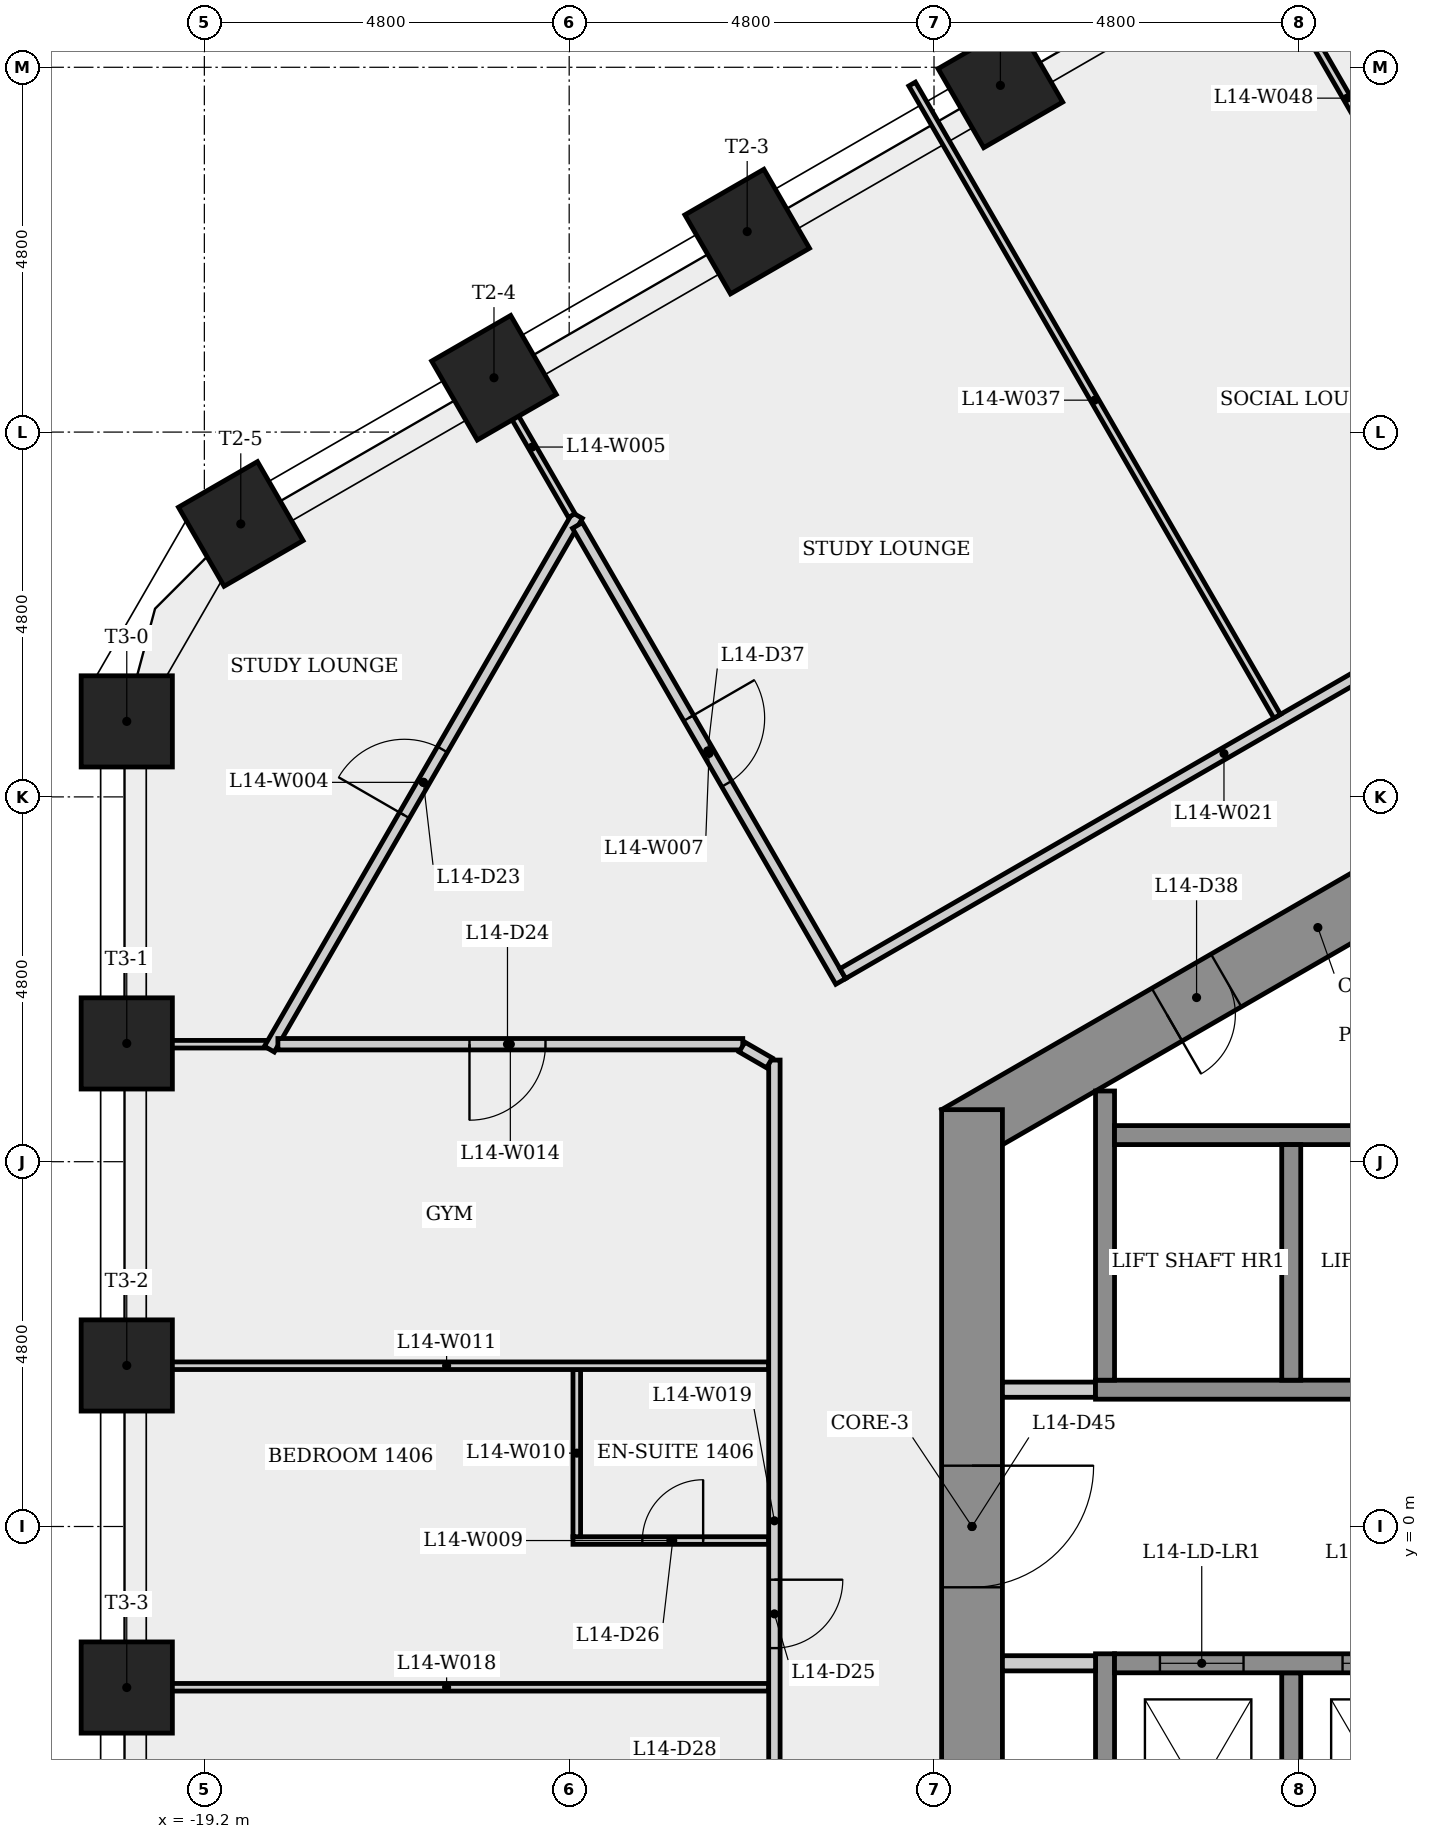
"""IFC4 building model, lengths in metres.
Left out: names, types, materials, properties, quantities, classifications, styles, units other than length and angle.
Written with IfcOpenShell. Run it as: python <this file> out.ifc"""

import sys

from ifc_helpers import new_model, si_unit, direction, frame, frame_2d, origin, origin_2d, place, context, subcontext, project, spatial, rectangle, extrude, element, fill, save


model = new_model("IFC4")
c1 = context("Model", 3, precision=1e-05, world=origin(), true_north=direction((0.0, 1.0)))
c2 = subcontext(c1, "Body", "Model", "MODEL_VIEW")
j1 = project(units=[si_unit("LENGTHUNIT", "METRE"), si_unit("PLANEANGLEUNIT", "RADIAN")], contexts=[c1])
p1 = place(None, origin())
s1 = spatial("IfcSite", under=j1, at=p1, CompositionType="ELEMENT")
p2 = place(p1, origin())
s2 = spatial("IfcBuilding", under=s1, at=p2, CompositionType="ELEMENT")
p3 = place(p2, frame((0.0, 0.0, 56.1)))
s3 = spatial("IfcBuildingStorey", under=s2, at=p3, CompositionType="ELEMENT", Elevation=56.1)
p4 = place(p3, frame((0.2, 10.623, 0.0), z_axis=(0.0, 0.0, 1.0), x_axis=(-0.866023993627, -0.500002442456, 0.0)))
e1 = element("IfcWall", 1, at=p4, inside=s3, PredefinedType="SHEAR", context=c2, shape_type="SweptSolid", body=[
    extrude(rectangle(XDim=10.97, YDim=0.8, at=frame_2d((5.485, 0.0))), origin(), (0.0, 0.0, 1.0), 3.4),
])
p5 = place(p4, frame((6.877, 0.0, 0.0)))
e2 = element("IfcOpeningElement", 2, at=p5, cuts=e1, PredefinedType="OPENING", context=c2, shape_type="SweptSolid", body=[
    extrude(rectangle(XDim=0.9, YDim=2.1, at=frame_2d((0.45, 1.05))), frame((0.0, 0.41, 0.0), z_axis=(0.0, -1.0, 0.0), x_axis=(1.0, 0.0, 0.0)), (0.0, 0.0, 1.0), 0.82),
])
p6 = place(p3, frame((-9.1, 5.485, 0.0), z_axis=(0.0, 0.0, 1.0), x_axis=(0.0, -1.0, 0.0)))
e3 = element("IfcWall", 3, at=p6, inside=s3, PredefinedType="SHEAR", context=c2, shape_type="SweptSolid", body=[
    extrude(rectangle(XDim=10.97, YDim=0.8, at=frame_2d((5.485, 0.0))), origin(), (0.0, 0.0, 1.0), 3.4),
])
p7 = place(p6, frame((4.685, 0.0, 0.0)))
e4 = element("IfcOpeningElement", 4, at=p7, cuts=e3, PredefinedType="OPENING", context=c2, shape_type="SweptSolid", body=[
    extrude(rectangle(XDim=1.6, YDim=2.1, at=frame_2d((0.8, 1.05))), frame((0.0, 0.41, 0.0), z_axis=(0.0, -1.0, 0.0), x_axis=(1.0, 0.0, 0.0)), (0.0, 0.0, 1.0), 0.82),
])
for number, where, z_axis, x_axis in (
    (5, (-8.727, 18.962, 0.0), (0.0, 0.0, 1.0), (-0.5, 0.866, 0.0)),
    (6, (-12.058, 17.038, 0.0), (0.0, 0.0, 1.0), (-0.5, 0.866, 0.0)),
    (7, (-15.389, 15.115, 0.0), (0.0, 0.0, 1.0), (-0.5, 0.866, 0.0)),
    (8, (-18.721, 13.192, 0.0), (0.0, 0.0, 1.0), (-0.5, 0.866, 0.0)),
    (9, (-20.221, 10.594, 0.0), (0.0, 0.0, 1.0), (-1.0, 0.0, 0.0)),
    (10, (-20.221, 6.356, 0.0), (0.0, 0.0, 1.0), (-1.0, 0.0, 0.0)),
    (11, (-20.221, 2.119, 0.0), (0.0, 0.0, 1.0), (-1.0, 0.0, 0.0)),
    (12, (-20.221, -2.119, 0.0), (0.0, 0.0, 1.0), (-1.0, 0.0, 0.0)),
):
    element("IfcColumn", number, at=place(p3, frame(where, z_axis=z_axis, x_axis=x_axis)), inside=s3, PredefinedType="COLUMN", context=c2, shape_type="SweptSolid", body=[
        extrude(rectangle(XDim=1.2, YDim=1.2, at=origin_2d()), origin(), (0.0, 0.0, 1.0), 3.4),
    ])
p8 = place(p3, frame((-18.382, 6.346, 0.0), z_axis=(0.0, 0.0, 1.0), x_axis=(-1.0, 0.0, 0.0)))
e13 = element("IfcWall", 13, at=p8, inside=s3, PredefinedType="PARTITIONING", context=c2, shape_type="SweptSolid", body=[
    extrude(rectangle(XDim=1.868, YDim=0.1, at=frame_2d((0.934, 0.0))), origin(), (0.0, 0.0, 1.0), 3.05),
])
p9 = place(p3, frame((-18.345, 6.281, 0.0), z_axis=(0.0, 0.0, 1.0), x_axis=(0.499990083853, 0.866031128799, 0.0)))
e14 = element("IfcWall", 14, at=p9, inside=s3, PredefinedType="PARTITIONING", context=c2, shape_type="SweptSolid", body=[
    extrude(rectangle(XDim=8.107, YDim=0.15, at=frame_2d((4.054, 0.0))), origin(), (0.0, 0.0, 1.0), 3.05),
])
p10 = place(p9, frame((3.553, 0.0, 0.0)))
e15 = element("IfcOpeningElement", 15, at=p10, cuts=e14, PredefinedType="OPENING", context=c2, shape_type="SweptSolid", body=[
    extrude(rectangle(XDim=1.0, YDim=2.1, at=frame_2d((0.5, 1.05))), frame((0.0, 0.085, 0.0), z_axis=(0.0, -1.0, 0.0), x_axis=(1.0, 0.0, 0.0)), (0.0, 0.0, 1.0), 0.17),
])
p11 = place(p3, frame((-15.407, 15.104, 0.0), z_axis=(0.0, 0.0, 1.0), x_axis=(0.500074377092, -0.865982457891, 0.0)))
e16 = element("IfcWall", 16, at=p11, inside=s3, PredefinedType="PARTITIONING", context=c2, shape_type="SweptSolid", body=[
    extrude(rectangle(XDim=2.082, YDim=0.1, at=frame_2d((1.041, 0.0))), origin(), (0.0, 0.0, 1.0), 3.05),
])
p12 = place(p3, frame((-14.291, 13.172, 0.0), z_axis=(0.0, 0.0, 1.0), x_axis=(0.499989880739, -0.866031246064, 0.0)))
e17 = element("IfcWall", 17, at=p12, inside=s3, PredefinedType="PARTITIONING", context=c2, shape_type="SweptSolid", body=[
    extrude(rectangle(XDim=6.928, YDim=0.15, at=frame_2d((3.464, 0.0))), origin(), (0.0, 0.0, 1.0), 3.05),
])
p13 = place(p12, frame((2.927, 0.0, 0.0)))
e18 = element("IfcOpeningElement", 18, at=p13, cuts=e17, PredefinedType="OPENING", context=c2, shape_type="SweptSolid", body=[
    extrude(rectangle(XDim=1.0, YDim=2.1, at=frame_2d((0.5, 1.05))), frame((0.0, 0.085, 0.0), z_axis=(0.0, -1.0, 0.0), x_axis=(1.0, 0.0, 0.0)), (0.0, 0.0, 1.0), 0.17),
])
p14 = place(p3, frame((-14.35, -0.185, 0.0), z_axis=(0.0, 0.0, 1.0), x_axis=(1.0, 0.0, 0.0)))
e19 = element("IfcWall", 19, at=p14, inside=s3, PredefinedType="PARTITIONING", context=c2, shape_type="SweptSolid", body=[
    extrude(rectangle(XDim=2.575, YDim=0.1, at=frame_2d((1.288, 0.0))), origin(), (0.0, 0.0, 1.0), 3.05),
])
p15 = place(p14, frame((0.913, 0.0, 0.0)))
e20 = element("IfcOpeningElement", 20, at=p15, cuts=e19, PredefinedType="OPENING", context=c2, shape_type="SweptSolid", body=[
    extrude(rectangle(XDim=0.8, YDim=2.1, at=frame_2d((0.4, 1.05))), frame((0.0, 0.06, 0.0), z_axis=(0.0, -1.0, 0.0), x_axis=(1.0, 0.0, 0.0)), (0.0, 0.0, 1.0), 0.12),
])
p16 = place(p3, frame((-14.3, 2.065, 0.0), z_axis=(0.0, 0.0, 1.0), x_axis=(0.0, -1.0, 0.0)))
e21 = element("IfcWall", 21, at=p16, inside=s3, PredefinedType="PARTITIONING", context=c2, shape_type="SweptSolid", body=[
    extrude(rectangle(XDim=2.2, YDim=0.1, at=frame_2d((1.1, 0.0))), origin(), (0.0, 0.0, 1.0), 3.05),
])
p17 = place(p3, frame((-20.25, 2.115, 0.0), z_axis=(0.0, 0.0, 1.0), x_axis=(1.0, 0.0, 0.0)))
e22 = element("IfcWall", 22, at=p17, inside=s3, PredefinedType="PARTITIONING", context=c2, shape_type="SweptSolid", body=[
    extrude(rectangle(XDim=8.476, YDim=0.1, at=frame_2d((4.238, 0.0))), origin(), (0.0, 0.0, 1.0), 3.05),
])
p18 = place(p3, frame((-12.116, 6.346, 0.0), z_axis=(0.0, 0.0, 1.0), x_axis=(-1.0, 0.0, 0.0)))
e23 = element("IfcWall", 23, at=p18, inside=s3, PredefinedType="PARTITIONING", context=c2, shape_type="SweptSolid", body=[
    extrude(rectangle(XDim=6.116, YDim=0.15, at=frame_2d((3.058, 0.0))), origin(), (0.0, 0.0, 1.0), 3.05),
])
p19 = place(p18, frame((2.596, 0.0, 0.0)))
e24 = element("IfcOpeningElement", 24, at=p19, cuts=e23, PredefinedType="OPENING", context=c2, shape_type="SweptSolid", body=[
    extrude(rectangle(XDim=1.0, YDim=2.1, at=frame_2d((0.5, 1.05))), frame((0.0, 0.085, 0.0), z_axis=(0.0, -1.0, 0.0), x_axis=(1.0, 0.0, 0.0)), (0.0, 0.0, 1.0), 0.17),
])
p20 = place(p3, frame((-11.775, -2.115, 0.0), z_axis=(0.0, 0.0, 1.0), x_axis=(-1.0, 0.0, 0.0)))
e25 = element("IfcWall", 25, at=p20, inside=s3, PredefinedType="PARTITIONING", context=c2, shape_type="SweptSolid", body=[
    extrude(rectangle(XDim=8.476, YDim=0.1, at=frame_2d((4.238, 0.0))), origin(), (0.0, 0.0, 1.0), 3.05),
])
p21 = place(p3, frame((-11.7, 6.137, 0.0), z_axis=(0.0, 0.0, 1.0), x_axis=(0.0, -1.0, 0.0)))
e26 = element("IfcWall", 26, at=p21, inside=s3, PredefinedType="PARTITIONING", context=c2, shape_type="SweptSolid", body=[
    extrude(rectangle(XDim=12.125, YDim=0.15, at=frame_2d((6.062, 0.0))), origin(), (0.0, 0.0, 1.0), 3.05),
])
p22 = place(p21, frame((6.837, 0.0, 0.0)))
e27 = element("IfcOpeningElement", 27, at=p22, cuts=e26, PredefinedType="OPENING", context=c2, shape_type="SweptSolid", body=[
    extrude(rectangle(XDim=0.9, YDim=2.1, at=frame_2d((0.45, 1.05))), frame((0.0, 0.085, 0.0), z_axis=(0.0, -1.0, 0.0), x_axis=(1.0, 0.0, 0.0)), (0.0, 0.0, 1.0), 0.17),
])
p23 = place(p3, frame((-11.765, 6.1, 0.0), z_axis=(0.0, 0.0, 1.0), x_axis=(-0.865893231143, 0.500228859883, 0.0)))
e28 = element("IfcWall", 28, at=p23, inside=s3, PredefinedType="PARTITIONING", context=c2, shape_type="SweptSolid", body=[
    extrude(rectangle(XDim=0.417, YDim=0.15, at=frame_2d((0.208, 0.0))), origin(), (0.0, 0.0, 1.0), 3.05),
])
p24 = place(p3, frame((-10.8, 7.275, 0.0), z_axis=(0.0, 0.0, 1.0), x_axis=(0.866027969706, 0.499995555667, 0.0)))
e29 = element("IfcWall", 29, at=p24, inside=s3, PredefinedType="PARTITIONING", context=c2, shape_type="SweptSolid", body=[
    extrude(rectangle(XDim=11.582, YDim=0.15, at=frame_2d((5.791, 0.0))), origin(), (0.0, 0.0, 1.0), 3.05),
])
p25 = place(p24, frame((8.589, 0.0, 0.0)))
e30 = element("IfcOpeningElement", 30, at=p25, cuts=e29, PredefinedType="OPENING", context=c2, shape_type="SweptSolid", body=[
    extrude(rectangle(XDim=1.0, YDim=2.1, at=frame_2d((0.5, 1.05))), frame((0.0, 0.085, 0.0), z_axis=(0.0, -1.0, 0.0), x_axis=(1.0, 0.0, 0.0)), (0.0, 0.0, 1.0), 0.17),
])
p26 = place(p3, frame((-8.7, 1.8, 0.0), z_axis=(0.0, 0.0, 1.0), x_axis=(1.0, 0.0, 0.0)))
e31 = element("IfcWall", 31, at=p26, inside=s3, PredefinedType="PARTITIONING", context=c2, shape_type="SweptSolid", body=[
    extrude(rectangle(XDim=1.225, YDim=0.2, at=frame_2d((0.613, 0.0))), origin(), (0.0, 0.0, 1.0), 3.05),
])
p27 = place(p3, frame((-7.475, 1.8, 0.0), z_axis=(0.0, 0.0, 1.0), x_axis=(1.0, 0.0, 0.0)))
e32 = element("IfcWall", 32, at=p27, inside=s3, PredefinedType="SHEAR", context=c2, shape_type="SweptSolid", body=[
    extrude(rectangle(XDim=14.95, YDim=0.25, at=frame_2d((7.475, 0.0))), origin(), (0.0, 0.0, 1.0), 3.05),
])
p28 = place(p3, frame((-7.35, -5.73, 0.0), z_axis=(0.0, 0.0, 1.0), x_axis=(0.0, 1.0, 0.0)))
e33 = element("IfcWall", 33, at=p28, inside=s3, PredefinedType="SHEAR", context=c2, shape_type="SweptSolid", body=[
    extrude(rectangle(XDim=4.055, YDim=0.25, at=frame_2d((2.028, 0.0))), origin(), (0.0, 0.0, 1.0), 3.05),
])
p29 = place(p3, frame((-7.35, 1.925, 0.0), z_axis=(0.0, 0.0, 1.0), x_axis=(0.0, 1.0, 0.0)))
e34 = element("IfcWall", 34, at=p29, inside=s3, PredefinedType="SHEAR", context=c2, shape_type="SweptSolid", body=[
    extrude(rectangle(XDim=3.805, YDim=0.25, at=frame_2d((1.903, 0.0))), origin(), (0.0, 0.0, 1.0), 3.05),
])
p30 = place(p3, frame((-7.225, 5.15, 0.0), z_axis=(0.0, 0.0, 1.0), x_axis=(1.0, 0.0, 0.0)))
e35 = element("IfcWall", 35, at=p30, inside=s3, PredefinedType="SHEAR", context=c2, shape_type="SweptSolid", body=[
    extrude(rectangle(XDim=14.7, YDim=0.25, at=frame_2d((7.35, 0.0))), origin(), (0.0, 0.0, 1.0), 3.05),
])
p31 = place(p3, frame((-7.475, -1.8, 0.0), z_axis=(0.0, 0.0, 1.0), x_axis=(-1.0, 0.0, 0.0)))
e36 = element("IfcWall", 36, at=p31, inside=s3, PredefinedType="PARTITIONING", context=c2, shape_type="SweptSolid", body=[
    extrude(rectangle(XDim=1.225, YDim=0.2, at=frame_2d((0.613, 0.0))), origin(), (0.0, 0.0, 1.0), 3.05),
])
p32 = place(p3, frame((-5.085, 10.661, 0.0), z_axis=(0.0, 0.0, 1.0), x_axis=(-0.49998793222, 0.866032371008, 0.0)))
e37 = element("IfcWall", 37, at=p32, inside=s3, PredefinedType="PARTITIONING", context=c2, shape_type="SweptSolid", body=[
    extrude(rectangle(XDim=9.606, YDim=0.1, at=frame_2d((4.803, 0.0))), origin(), (0.0, 0.0, 1.0), 3.05),
])
for number, where, z_axis, x_axis in (
    (38, (-4.9, -1.925, 0.0), (0.0, 0.0, 1.0), (0.0, -1.0, 0.0)),
    (39, (-4.9, 5.025, 0.0), (0.0, 0.0, 1.0), (0.0, -1.0, 0.0)),
):
    element("IfcWall", number, at=place(p3, frame(where, z_axis=z_axis, x_axis=x_axis)), inside=s3, PredefinedType="SHEAR", context=c2, shape_type="SweptSolid", body=[
        extrude(rectangle(XDim=3.1, YDim=0.25, at=frame_2d((1.55, 0.0))), origin(), (0.0, 0.0, 1.0), 3.4),
    ])
p33 = place(p3, frame((-7.225, -1.8, 0.0), z_axis=(0.0, 0.0, 1.0), x_axis=(1.0, 0.0, 0.0)))
e40 = element("IfcWall", 40, at=p33, inside=s3, PredefinedType="SHEAR", context=c2, shape_type="SweptSolid", body=[
    extrude(rectangle(XDim=14.7, YDim=0.25, at=frame_2d((7.35, 0.0))), origin(), (0.0, 0.0, 1.0), 3.05),
])
p34 = place(p33, frame((0.597, 0.0, 0.0)))
e41 = element("IfcOpeningElement", 41, at=p34, cuts=e40, PredefinedType="OPENING", context=c2, shape_type="SweptSolid", body=[
    extrude(rectangle(XDim=1.1, YDim=2.1, at=frame_2d((0.55, 1.05))), frame((0.0, 0.135, 0.0), z_axis=(0.0, -1.0, 0.0), x_axis=(1.0, 0.0, 0.0)), (0.0, 0.0, 1.0), 0.27),
])
p35 = place(p33, frame((3.0, 0.0, 0.0)))
e42 = element("IfcOpeningElement", 42, at=p35, cuts=e40, PredefinedType="OPENING", context=c2, shape_type="SweptSolid", body=[
    extrude(rectangle(XDim=1.1, YDim=2.1, at=frame_2d((0.55, 1.05))), frame((0.0, 0.135, 0.0), z_axis=(0.0, -1.0, 0.0), x_axis=(1.0, 0.0, 0.0)), (0.0, 0.0, 1.0), 0.27),
])
p36 = place(p33, frame((5.45, 0.0, 0.0)))
e43 = element("IfcOpeningElement", 43, at=p36, cuts=e40, PredefinedType="OPENING", context=c2, shape_type="SweptSolid", body=[
    extrude(rectangle(XDim=1.1, YDim=2.1, at=frame_2d((0.55, 1.05))), frame((0.0, 0.135, 0.0), z_axis=(0.0, -1.0, 0.0), x_axis=(1.0, 0.0, 0.0)), (0.0, 0.0, 1.0), 0.27),
])
p37 = place(p33, frame((7.9, 0.0, 0.0)))
e44 = element("IfcOpeningElement", 44, at=p37, cuts=e40, PredefinedType="OPENING", context=c2, shape_type="SweptSolid", body=[
    extrude(rectangle(XDim=1.1, YDim=2.1, at=frame_2d((0.55, 1.05))), frame((0.0, 0.135, 0.0), z_axis=(0.0, -1.0, 0.0), x_axis=(1.0, 0.0, 0.0)), (0.0, 0.0, 1.0), 0.27),
])
p38 = place(p33, frame((10.35, 0.0, 0.0)))
e45 = element("IfcOpeningElement", 45, at=p38, cuts=e40, PredefinedType="OPENING", context=c2, shape_type="SweptSolid", body=[
    extrude(rectangle(XDim=1.1, YDim=2.1, at=frame_2d((0.55, 1.05))), frame((0.0, 0.135, 0.0), z_axis=(0.0, -1.0, 0.0), x_axis=(1.0, 0.0, 0.0)), (0.0, 0.0, 1.0), 0.27),
])
p39 = place(p3, frame((-2.951, 16.692, 0.0), z_axis=(0.0, 0.0, 1.0), x_axis=(-0.499975014836, 0.866039828495, 0.0)))
e46 = element("IfcWall", 46, at=p39, inside=s3, PredefinedType="PARTITIONING", context=c2, shape_type="SweptSolid", body=[
    extrude(rectangle(XDim=4.853, YDim=0.1, at=frame_2d((2.427, 0.0))), origin(), (0.0, 0.0, 1.0), 3.05),
])
p40 = place(p34, origin())
e47 = element("IfcDoor", 47, at=p40, inside=s3, OperationType="SLIDING_TO_LEFT", PredefinedType="DOOR", context=c2, shape_type="SweptSolid", body=[
    extrude(rectangle(XDim=1.1, YDim=2.1, at=frame_2d((0.55, 1.05))), frame((0.0, 0.025, 0.0), z_axis=(0.0, -1.0, 0.0), x_axis=(1.0, 0.0, 0.0)), (0.0, 0.0, 1.0), 0.05),
])
fill(e41, e47)
p41 = place(p35, origin())
e48 = element("IfcDoor", 48, at=p41, inside=s3, OperationType="SLIDING_TO_LEFT", PredefinedType="DOOR", context=c2, shape_type="SweptSolid", body=[
    extrude(rectangle(XDim=1.1, YDim=2.1, at=frame_2d((0.55, 1.05))), frame((0.0, 0.025, 0.0), z_axis=(0.0, -1.0, 0.0), x_axis=(1.0, 0.0, 0.0)), (0.0, 0.0, 1.0), 0.05),
])
fill(e42, e48)
p42 = place(p10, origin())
e49 = element("IfcDoor", 49, at=p42, inside=s3, OperationType="SINGLE_SWING_LEFT", PredefinedType="DOOR", context=c2, shape_type="SweptSolid", body=[
    extrude(rectangle(XDim=1.0, YDim=2.1, at=frame_2d((0.5, 1.05))), frame((0.0, 0.025, 0.0), z_axis=(0.0, -1.0, 0.0), x_axis=(1.0, 0.0, 0.0)), (0.0, 0.0, 1.0), 0.05),
])
fill(e15, e49)
p43 = place(p19, origin())
e50 = element("IfcDoor", 50, at=p43, inside=s3, OperationType="SINGLE_SWING_RIGHT", PredefinedType="DOOR", context=c2, shape_type="SweptSolid", body=[
    extrude(rectangle(XDim=1.0, YDim=2.1, at=frame_2d((0.5, 1.05))), frame((0.0, 0.025, 0.0), z_axis=(0.0, -1.0, 0.0), x_axis=(1.0, 0.0, 0.0)), (0.0, 0.0, 1.0), 0.05),
])
fill(e24, e50)
p44 = place(p22, origin())
e51 = element("IfcDoor", 51, at=p44, inside=s3, OperationType="SINGLE_SWING_LEFT", PredefinedType="DOOR", context=c2, shape_type="SweptSolid", body=[
    extrude(rectangle(XDim=0.9, YDim=2.1, at=frame_2d((0.45, 1.05))), frame((0.0, 0.025, 0.0), z_axis=(0.0, -1.0, 0.0), x_axis=(1.0, 0.0, 0.0)), (0.0, 0.0, 1.0), 0.05),
])
fill(e27, e51)
p45 = place(p15, origin())
e52 = element("IfcDoor", 52, at=p45, inside=s3, OperationType="SINGLE_SWING_RIGHT", PredefinedType="DOOR", context=c2, shape_type="SweptSolid", body=[
    extrude(rectangle(XDim=0.8, YDim=2.1, at=frame_2d((0.4, 1.05))), frame((0.0, 0.025, 0.0), z_axis=(0.0, -1.0, 0.0), x_axis=(1.0, 0.0, 0.0)), (0.0, 0.0, 1.0), 0.05),
])
fill(e20, e52)
p46 = place(p13, origin())
e53 = element("IfcDoor", 53, at=p46, inside=s3, OperationType="SINGLE_SWING_LEFT", PredefinedType="DOOR", context=c2, shape_type="SweptSolid", body=[
    extrude(rectangle(XDim=1.0, YDim=2.1, at=frame_2d((0.5, 1.05))), frame((0.0, 0.025, 0.0), z_axis=(0.0, -1.0, 0.0), x_axis=(1.0, 0.0, 0.0)), (0.0, 0.0, 1.0), 0.05),
])
fill(e18, e53)
p47 = place(p5, origin())
e54 = element("IfcDoor", 54, at=p47, inside=s3, OperationType="SINGLE_SWING_RIGHT", PredefinedType="DOOR", context=c2, shape_type="SweptSolid", body=[
    extrude(rectangle(XDim=0.9, YDim=2.1, at=frame_2d((0.45, 1.05))), frame((0.0, 0.025, 0.0), z_axis=(0.0, -1.0, 0.0), x_axis=(1.0, 0.0, 0.0)), (0.0, 0.0, 1.0), 0.05),
])
fill(e2, e54)
p48 = place(p7, origin())
e55 = element("IfcDoor", 55, at=p48, inside=s3, OperationType="SINGLE_SWING_LEFT", PredefinedType="DOOR", context=c2, shape_type="SweptSolid", body=[
    extrude(rectangle(XDim=1.6, YDim=2.1, at=frame_2d((0.8, 1.05))), frame((0.0, 0.025, 0.0), z_axis=(0.0, -1.0, 0.0), x_axis=(1.0, 0.0, 0.0)), (0.0, 0.0, 1.0), 0.05),
])
fill(e4, e55)
save(model, sys.argv[1])
